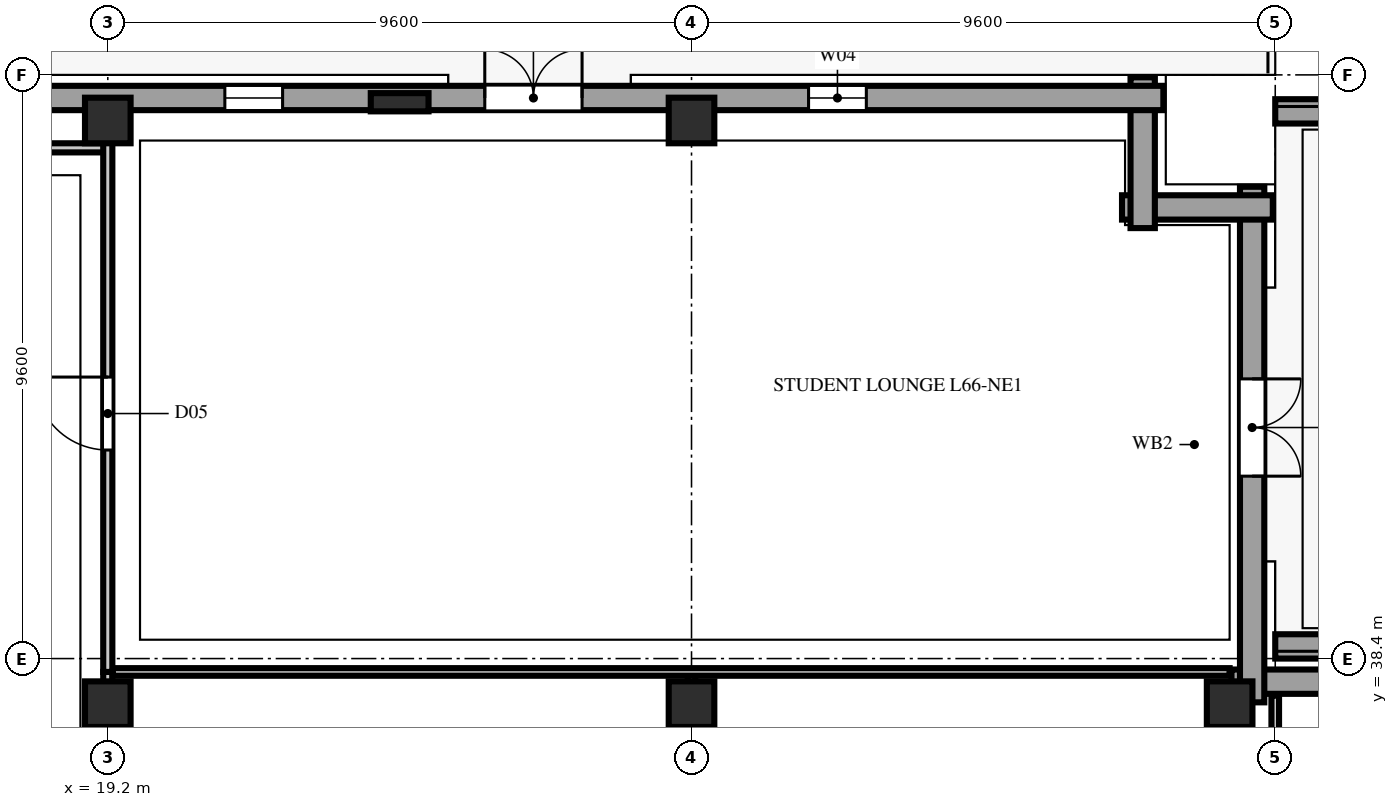
"""IFC4 building model, lengths in metres.
Left out: names, types, materials, properties, quantities, classifications, styles, units other than length and angle.
Written with IfcOpenShell. Run it as: python <this file> out.ifc"""

import sys

from ifc_helpers import new_model, si_unit, direction, frame, frame_2d, origin, origin_2d, place, context, subcontext, project, spatial, rectangle, extrude, element, fill, save


model = new_model("IFC4")
c1 = context("Model", 3, precision=1e-05, world=origin(), true_north=direction((0.0, 1.0)))
c2 = subcontext(c1, "Body", "Model", "MODEL_VIEW")
j1 = project(units=[si_unit("LENGTHUNIT", "METRE"), si_unit("PLANEANGLEUNIT", "RADIAN")], contexts=[c1])
p1 = place(None, origin())
s1 = spatial("IfcSite", under=j1, at=p1, CompositionType="ELEMENT")
p2 = place(p1, origin())
s2 = spatial("IfcBuilding", under=s1, at=p2, CompositionType="ELEMENT")
p3 = place(p2, frame((0.0, 0.0, 261.0)))
s3 = spatial("IfcBuildingStorey", under=s2, at=p3, CompositionType="ELEMENT", Elevation=261.0)
for number, where, z_axis, x_axis in (
    (1, (19.2, 37.65, 0.0), (0.0, 0.0, 1.0), (1.0, 0.0, 0.0)),
    (2, (19.2, 47.25, 0.0), (0.0, 0.0, 1.0), (1.0, 0.0, 0.0)),
    (3, (28.8, 37.65, 0.0), (0.0, 0.0, 1.0), (1.0, 0.0, 0.0)),
    (4, (28.8, 47.25, 0.0), (0.0, 0.0, 1.0), (1.0, 0.0, 0.0)),
    (5, (37.65, 37.65, 0.0), (0.0, 0.0, 1.0), (1.0, 0.0, 0.0)),
):
    element("IfcColumn", number, at=place(p3, frame(where, z_axis=z_axis, x_axis=x_axis)), inside=s3, PredefinedType="COLUMN", context=c2, shape_type="SweptSolid", body=[
        extrude(rectangle(XDim=0.75, YDim=0.75, at=origin_2d()), origin(), (0.0, 0.0, 1.0), 4.8),
    ])
p4 = place(p3, frame((24.0, 47.55, 0.0), z_axis=(0.0, 0.0, 1.0), x_axis=(1.0, 0.0, 0.0)))
e6 = element("IfcColumn", 6, at=p4, inside=s3, PredefinedType="PILASTER", context=c2, shape_type="SweptSolid", body=[
    extrude(rectangle(XDim=0.95, YDim=0.3, at=origin_2d()), origin(), (0.0, 0.0, 1.0), 4.8),
])
p5 = place(p3, frame((46.16, 38.02, 0.0), z_axis=(0.0, 0.0, 1.0), x_axis=(-1.0, 0.0, 0.0)))
e7 = element("IfcWall", 7, at=p5, inside=s3, PredefinedType="SOLIDWALL", context=c2, shape_type="SweptSolid", body=[
    extrude(rectangle(XDim=8.48, YDim=0.4, at=frame_2d((4.24, 0.0))), origin(), (0.0, 0.0, 1.0), 4.54),
])
p6 = place(p5, frame((4.46, 0.0, 0.85)))
e8 = element("IfcOpeningElement", 8, at=p6, cuts=e7, PredefinedType="OPENING", context=c2, shape_type="SweptSolid", body=[
    extrude(rectangle(XDim=1.8, YDim=1.85, at=frame_2d((0.9, 0.925))), frame((0.0, 0.212, 0.0), z_axis=(0.0, -1.0, 0.0), x_axis=(1.0, 0.0, 0.0)), (0.0, 0.0, 1.0), 0.424),
])
p7 = place(p3, frame((38.02, 37.68, 0.0), z_axis=(0.0, 0.0, 1.0), x_axis=(0.0, 1.0, 0.0)))
e9 = element("IfcWall", 9, at=p7, inside=s3, PredefinedType="SOLIDWALL", context=c2, shape_type="SweptSolid", body=[
    extrude(rectangle(XDim=8.48, YDim=0.4, at=frame_2d((4.24, 0.0))), origin(), (0.0, 0.0, 1.0), 4.54),
])
p8 = place(p7, frame((3.72, 0.0, 0.0)))
e10 = element("IfcOpeningElement", 10, at=p8, cuts=e9, PredefinedType="OPENING", context=c2, shape_type="SweptSolid", body=[
    extrude(rectangle(XDim=1.6, YDim=2.3, at=frame_2d((0.8, 1.15))), frame((0.0, 0.212, 0.0), z_axis=(0.0, -1.0, 0.0), x_axis=(1.0, 0.0, 0.0)), (0.0, 0.0, 1.0), 0.424),
])
p9 = place(p3, frame((38.36, 45.82, 0.0), z_axis=(0.0, 0.0, 1.0), x_axis=(-1.0, 0.0, 0.0)))
e11 = element("IfcWall", 11, at=p9, inside=s3, PredefinedType="SOLIDWALL", context=c2, shape_type="SweptSolid", body=[
    extrude(rectangle(XDim=2.48, YDim=0.4, at=frame_2d((1.24, 0.0))), origin(), (0.0, 0.0, 1.0), 4.54),
])
p10 = place(p3, frame((36.22, 45.48, 0.0), z_axis=(0.0, 0.0, 1.0), x_axis=(0.0, 1.0, 0.0)))
e12 = element("IfcWall", 12, at=p10, inside=s3, PredefinedType="SOLIDWALL", context=c2, shape_type="SweptSolid", body=[
    extrude(rectangle(XDim=2.48, YDim=0.4, at=frame_2d((1.24, 0.0))), origin(), (0.0, 0.0, 1.0), 4.54),
])
p11 = place(p3, frame((36.56, 47.62, 0.0), z_axis=(0.0, 0.0, 1.0), x_axis=(-1.0, 0.0, 0.0)))
e13 = element("IfcWall", 13, at=p11, inside=s3, PredefinedType="SOLIDWALL", context=c2, shape_type="SweptSolid", body=[
    extrude(rectangle(XDim=34.085, YDim=0.4, at=frame_2d((17.042, 0.0))), origin(), (0.0, 0.0, 1.0), 4.54),
])
p12 = place(p11, frame((9.56, 0.0, 0.0)))
e14 = element("IfcOpeningElement", 14, at=p12, cuts=e13, PredefinedType="OPENING", context=c2, shape_type="SweptSolid", body=[
    extrude(rectangle(XDim=1.6, YDim=2.3, at=frame_2d((0.8, 1.15))), frame((0.0, 0.212, 0.0), z_axis=(0.0, -1.0, 0.0), x_axis=(1.0, 0.0, 0.0)), (0.0, 0.0, 1.0), 0.424),
])
p13 = place(p11, frame((4.885, 0.0, 0.9)))
e15 = element("IfcOpeningElement", 15, at=p13, cuts=e13, PredefinedType="OPENING", context=c2, shape_type="SweptSolid", body=[
    extrude(rectangle(XDim=0.95, YDim=1.85, at=frame_2d((0.475, 0.925))), frame((0.0, 0.212, 0.0), z_axis=(0.0, -1.0, 0.0), x_axis=(1.0, 0.0, 0.0)), (0.0, 0.0, 1.0), 0.424),
])
p14 = place(p11, frame((14.485, 0.0, 0.9)))
e16 = element("IfcOpeningElement", 16, at=p14, cuts=e13, PredefinedType="OPENING", context=c2, shape_type="SweptSolid", body=[
    extrude(rectangle(XDim=0.95, YDim=1.85, at=frame_2d((0.475, 0.925))), frame((0.0, 0.212, 0.0), z_axis=(0.0, -1.0, 0.0), x_axis=(1.0, 0.0, 0.0)), (0.0, 0.0, 1.0), 0.424),
])
for number, where, z_axis, x_axis in (
    (17, (38.4, 38.6, 0.0), (0.0, 0.0, 1.0), (1.0, 0.0, 0.0)),
    (18, (38.4, 47.4, 0.0), (0.0, 0.0, 1.0), (1.0, 0.0, 0.0)),
):
    element("IfcWall", number, at=place(p3, frame(where, z_axis=z_axis, x_axis=x_axis)), inside=s3, PredefinedType="SOLIDWALL", context=c2, shape_type="SweptSolid", body=[
        extrude(rectangle(XDim=3.7, YDim=0.4, at=frame_2d((1.85, 0.0))), origin(), (0.0, 0.0, 1.0), 1.45),
    ])
p15 = place(p3, frame((17.05, 46.8, 0.0), z_axis=(0.0, 0.0, 1.0), x_axis=(1.0, 0.0, 0.0)))
e19 = element("IfcWall", 19, at=p15, inside=s3, PredefinedType="PARTITIONING", context=c2, shape_type="SweptSolid", body=[
    extrude(rectangle(XDim=2.15, YDim=0.15, at=frame_2d((1.075, 0.0))), origin(), (0.0, 0.0, 1.0), 4.54),
])
p16 = place(p3, frame((28.8, 20.95, 0.0), z_axis=(0.0, 0.0, 1.0), x_axis=(0.0, 1.0, 0.0)))
e20 = element("IfcWall", 20, at=p16, inside=s3, PredefinedType="PARTITIONING", context=c2, shape_type="SweptSolid", body=[
    extrude(rectangle(XDim=17.23, YDim=0.125, at=frame_2d((8.615, 0.0))), origin(), (0.0, 0.0, 1.0), 3.628),
])
p17 = place(p3, frame((38.4, 20.95, 0.0), z_axis=(0.0, 0.0, 1.0), x_axis=(0.0, 1.0, 0.0)))
e21 = element("IfcWall", 21, at=p17, inside=s3, PredefinedType="PARTITIONING", context=c2, shape_type="SweptSolid", body=[
    extrude(rectangle(XDim=16.84, YDim=0.125, at=frame_2d((8.42, 0.0))), origin(), (0.0, 0.0, 1.0), 4.54),
])
p18 = place(p3, frame((19.2, 20.95, 0.0), z_axis=(0.0, 0.0, 1.0), x_axis=(0.0, 1.0, 0.0)))
e22 = element("IfcWall", 22, at=p18, inside=s3, PredefinedType="PARTITIONING", context=c2, shape_type="SweptSolid", body=[
    extrude(rectangle(XDim=17.23, YDim=0.15, at=frame_2d((8.615, 0.0))), origin(), (0.0, 0.0, 1.0), 3.628),
])
p19 = place(p3, frame((19.28, 38.18, 0.0), z_axis=(0.0, 0.0, 1.0), x_axis=(1.0, 0.0, 0.0)))
e23 = element("IfcWall", 23, at=p19, inside=s3, PredefinedType="PARTITIONING", context=c2, shape_type="SweptSolid", body=[
    extrude(rectangle(XDim=18.37, YDim=0.125, at=frame_2d((9.185, 0.0))), origin(), (0.0, 0.0, 1.0), 4.54),
])
p20 = place(p3, frame((19.2, 38.18, 0.0), z_axis=(0.0, 0.0, 1.0), x_axis=(0.0, 1.0, 0.0)))
e24 = element("IfcWall", 24, at=p20, inside=s3, PredefinedType="PARTITIONING", context=c2, shape_type="SweptSolid", body=[
    extrude(rectangle(XDim=9.27, YDim=0.15, at=frame_2d((4.635, 0.0))), origin(), (0.0, 0.0, 1.0), 3.628),
])
p21 = place(p20, frame((3.65, 0.0, 0.0)))
e25 = element("IfcOpeningElement", 25, at=p21, cuts=e24, PredefinedType="OPENING", context=c2, shape_type="SweptSolid", body=[
    extrude(rectangle(XDim=1.2, YDim=2.2, at=frame_2d((0.6, 1.1))), frame((0.0, 0.087, 0.0), z_axis=(0.0, -1.0, 0.0), x_axis=(1.0, 0.0, 0.0)), (0.0, 0.0, 1.0), 0.174),
])
p22 = place(p8, frame((1.6, 0.0, 0.0), z_axis=(0.0, 0.0, 1.0), x_axis=(-1.0, 0.0, 0.0)))
e26 = element("IfcDoor", 26, at=p22, inside=s3, OperationType="DOUBLE_SWING_LEFT", PredefinedType="DOOR", context=c2, shape_type="SweptSolid", body=[
    extrude(rectangle(XDim=1.6, YDim=2.3, at=frame_2d((0.8, 1.15))), frame((0.0, 0.025, 0.0), z_axis=(0.0, -1.0, 0.0), x_axis=(1.0, 0.0, 0.0)), (0.0, 0.0, 1.0), 0.05),
])
fill(e10, e26)
p23 = place(p12, frame((1.6, 0.0, 0.0), z_axis=(0.0, 0.0, 1.0), x_axis=(-1.0, 0.0, 0.0)))
e27 = element("IfcDoor", 27, at=p23, inside=s3, OperationType="DOUBLE_SWING_LEFT", PredefinedType="DOOR", context=c2, shape_type="SweptSolid", body=[
    extrude(rectangle(XDim=1.6, YDim=2.3, at=frame_2d((0.8, 1.15))), frame((0.0, 0.025, 0.0), z_axis=(0.0, -1.0, 0.0), x_axis=(1.0, 0.0, 0.0)), (0.0, 0.0, 1.0), 0.05),
])
fill(e14, e27)
p24 = place(p13, origin())
e28 = element("IfcWindow", 28, at=p24, inside=s3, PartitioningType="SINGLE_PANEL", PredefinedType="WINDOW", context=c2, shape_type="SweptSolid", body=[
    extrude(rectangle(XDim=0.95, YDim=1.85, at=frame_2d((0.475, 0.925))), frame((0.0, 0.11, 0.0), z_axis=(0.0, -1.0, 0.0), x_axis=(1.0, 0.0, 0.0)), (0.0, 0.0, 1.0), 0.06),
])
fill(e15, e28)
p25 = place(p14, origin())
e29 = element("IfcWindow", 29, at=p25, inside=s3, PartitioningType="SINGLE_PANEL", PredefinedType="WINDOW", context=c2, shape_type="SweptSolid", body=[
    extrude(rectangle(XDim=0.95, YDim=1.85, at=frame_2d((0.475, 0.925))), frame((0.0, 0.11, 0.0), z_axis=(0.0, -1.0, 0.0), x_axis=(1.0, 0.0, 0.0)), (0.0, 0.0, 1.0), 0.06),
])
fill(e16, e29)
p26 = place(p21, origin())
e30 = element("IfcDoor", 30, at=p26, inside=s3, OperationType="SINGLE_SWING_RIGHT", PredefinedType="DOOR", context=c2, shape_type="SweptSolid", body=[
    extrude(rectangle(XDim=1.2, YDim=2.2, at=frame_2d((0.6, 1.1))), frame((0.0, 0.025, 0.0), z_axis=(0.0, -1.0, 0.0), x_axis=(1.0, 0.0, 0.0)), (0.0, 0.0, 1.0), 0.05),
])
fill(e25, e30)
save(model, sys.argv[1])
